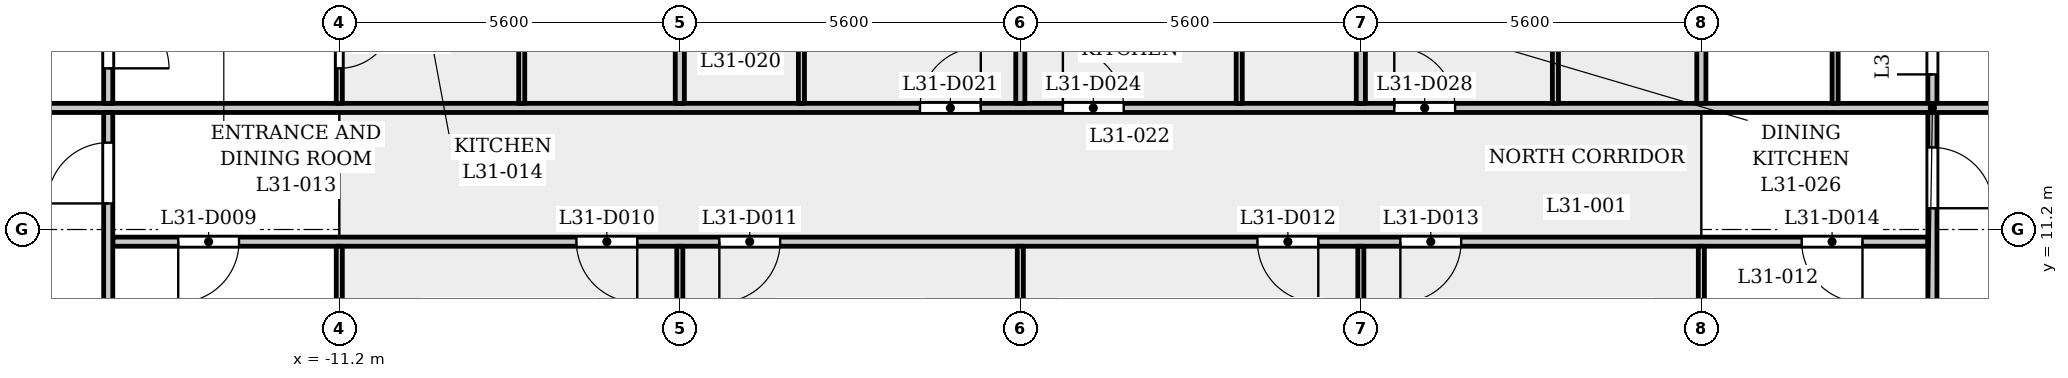
"""IFC4 building model, lengths in metres.
Left out: names, types, materials, properties, quantities, classifications, styles, units other than length and angle.
Written with IfcOpenShell. Run it as: python <this file> out.ifc"""

import sys

from ifc_helpers import new_model, si_unit, direction, frame, frame_2d, origin, place, context, subcontext, project, spatial, rectangle, extrude, element, fill, save


model = new_model("IFC4")
c1 = context("Model", 3, precision=1e-05, world=origin(), true_north=direction((0.0, 1.0)))
c2 = subcontext(c1, "Body", "Model", "MODEL_VIEW")
j1 = project(units=[si_unit("LENGTHUNIT", "METRE"), si_unit("PLANEANGLEUNIT", "RADIAN")], contexts=[c1])
p1 = place(None, origin())
s1 = spatial("IfcSite", under=j1, at=p1, CompositionType="ELEMENT")
p2 = place(p1, origin())
s2 = spatial("IfcBuilding", under=s1, at=p2, CompositionType="ELEMENT")
p3 = place(p2, frame((0.0, 0.0, 121.8)))
s3 = spatial("IfcBuildingStorey", under=s2, at=p3, CompositionType="ELEMENT", Elevation=121.8)
p4 = place(p3, frame((-14.925, 11.0, 0.0), z_axis=(0.0, 0.0, 1.0), x_axis=(1.0, 0.0, 0.0)))
e1 = element("IfcWall", 1, at=p4, inside=s3, PredefinedType="PARTITIONING", context=c2, shape_type="SweptSolid", body=[
    extrude(rectangle(XDim=29.85, YDim=0.15, at=frame_2d((14.925, 0.0))), origin(), (0.0, 0.0, 1.0), 3.15),
])
p5 = place(p4, frame((1.076, 0.0, 0.0)))
e2 = element("IfcOpeningElement", 2, at=p5, cuts=e1, PredefinedType="OPENING", context=c2, shape_type="SweptSolid", body=[
    extrude(rectangle(XDim=1.0, YDim=2.1, at=frame_2d((0.5, 1.05))), frame((0.0, 0.085, 0.0), z_axis=(0.0, -1.0, 0.0), x_axis=(1.0, 0.0, 0.0)), (0.0, 0.0, 1.0), 0.17),
])
p6 = place(p4, frame((7.625, 0.0, 0.0)))
e3 = element("IfcOpeningElement", 3, at=p6, cuts=e1, PredefinedType="OPENING", context=c2, shape_type="SweptSolid", body=[
    extrude(rectangle(XDim=1.0, YDim=2.1, at=frame_2d((0.5, 1.05))), frame((0.0, 0.085, 0.0), z_axis=(0.0, -1.0, 0.0), x_axis=(1.0, 0.0, 0.0)), (0.0, 0.0, 1.0), 0.17),
])
p7 = place(p4, frame((9.975, 0.0, 0.0)))
e4 = element("IfcOpeningElement", 4, at=p7, cuts=e1, PredefinedType="OPENING", context=c2, shape_type="SweptSolid", body=[
    extrude(rectangle(XDim=1.0, YDim=2.1, at=frame_2d((0.5, 1.05))), frame((0.0, 0.085, 0.0), z_axis=(0.0, -1.0, 0.0), x_axis=(1.0, 0.0, 0.0)), (0.0, 0.0, 1.0), 0.17),
])
p8 = place(p4, frame((18.825, 0.0, 0.0)))
e5 = element("IfcOpeningElement", 5, at=p8, cuts=e1, PredefinedType="OPENING", context=c2, shape_type="SweptSolid", body=[
    extrude(rectangle(XDim=1.0, YDim=2.1, at=frame_2d((0.5, 1.05))), frame((0.0, 0.085, 0.0), z_axis=(0.0, -1.0, 0.0), x_axis=(1.0, 0.0, 0.0)), (0.0, 0.0, 1.0), 0.17),
])
p9 = place(p4, frame((21.175, 0.0, 0.0)))
e6 = element("IfcOpeningElement", 6, at=p9, cuts=e1, PredefinedType="OPENING", context=c2, shape_type="SweptSolid", body=[
    extrude(rectangle(XDim=1.0, YDim=2.1, at=frame_2d((0.5, 1.05))), frame((0.0, 0.085, 0.0), z_axis=(0.0, -1.0, 0.0), x_axis=(1.0, 0.0, 0.0)), (0.0, 0.0, 1.0), 0.17),
])
p10 = place(p4, frame((27.775, 0.0, 0.0)))
e7 = element("IfcOpeningElement", 7, at=p10, cuts=e1, PredefinedType="OPENING", context=c2, shape_type="SweptSolid", body=[
    extrude(rectangle(XDim=1.0, YDim=2.1, at=frame_2d((0.5, 1.05))), frame((0.0, 0.085, 0.0), z_axis=(0.0, -1.0, 0.0), x_axis=(1.0, 0.0, 0.0)), (0.0, 0.0, 1.0), 0.17),
])
p11 = place(p3, frame((-17.4, 13.2, 0.0), z_axis=(0.0, 0.0, 1.0), x_axis=(1.0, 0.0, 0.0)))
e8 = element("IfcWall", 8, at=p11, inside=s3, PredefinedType="PARTITIONING", context=c2, shape_type="SweptSolid", body=[
    extrude(rectangle(XDim=34.8, YDim=0.15, at=frame_2d((17.4, 0.0))), origin(), (0.0, 0.0, 1.0), 3.15),
])
p12 = place(p11, frame((0.25, 0.0, 0.0)))
e9 = element("IfcOpeningElement", 9, at=p12, cuts=e8, PredefinedType="OPENING", context=c2, shape_type="SweptSolid", body=[
    extrude(rectangle(XDim=1.0, YDim=2.1, at=frame_2d((0.5, 1.05))), frame((0.0, 0.085, 0.0), z_axis=(0.0, -1.0, 0.0), x_axis=(1.0, 0.0, 0.0)), (0.0, 0.0, 1.0), 0.17),
])
p13 = place(p11, frame((33.65, 0.0, 0.0)))
e10 = element("IfcOpeningElement", 10, at=p13, cuts=e8, PredefinedType="OPENING", context=c2, shape_type="SweptSolid", body=[
    extrude(rectangle(XDim=1.0, YDim=2.1, at=frame_2d((0.5, 1.05))), frame((0.0, 0.085, 0.0), z_axis=(0.0, -1.0, 0.0), x_axis=(1.0, 0.0, 0.0)), (0.0, 0.0, 1.0), 0.17),
])
p14 = place(p11, frame((15.75, 0.0, 0.0)))
e11 = element("IfcOpeningElement", 11, at=p14, cuts=e8, PredefinedType="OPENING", context=c2, shape_type="SweptSolid", body=[
    extrude(rectangle(XDim=1.0, YDim=2.1, at=frame_2d((0.5, 1.05))), frame((0.0, 0.085, 0.0), z_axis=(0.0, -1.0, 0.0), x_axis=(1.0, 0.0, 0.0)), (0.0, 0.0, 1.0), 0.17),
])
p15 = place(p11, frame((18.1, 0.0, 0.0)))
e12 = element("IfcOpeningElement", 12, at=p15, cuts=e8, PredefinedType="OPENING", context=c2, shape_type="SweptSolid", body=[
    extrude(rectangle(XDim=1.0, YDim=2.1, at=frame_2d((0.5, 1.05))), frame((0.0, 0.085, 0.0), z_axis=(0.0, -1.0, 0.0), x_axis=(1.0, 0.0, 0.0)), (0.0, 0.0, 1.0), 0.17),
])
p16 = place(p11, frame((23.55, 0.0, 0.0)))
e13 = element("IfcOpeningElement", 13, at=p16, cuts=e8, PredefinedType="OPENING", context=c2, shape_type="SweptSolid", body=[
    extrude(rectangle(XDim=1.0, YDim=2.1, at=frame_2d((0.5, 1.05))), frame((0.0, 0.085, 0.0), z_axis=(0.0, -1.0, 0.0), x_axis=(1.0, 0.0, 0.0)), (0.0, 0.0, 1.0), 0.17),
])
p17 = place(p3, frame((-15.0, 6.769, 0.0), z_axis=(0.0, 0.0, 1.0), x_axis=(0.0, 1.0, 0.0)))
e14 = element("IfcWall", 14, at=p17, inside=s3, PredefinedType="PARTITIONING", context=c2, shape_type="SweptSolid", body=[
    extrude(rectangle(XDim=6.356, YDim=0.15, at=frame_2d((3.178, 0.0))), origin(), (0.0, 0.0, 1.0), 3.15),
])
p18 = place(p17, frame((4.86, 0.0, 0.0)))
e15 = element("IfcOpeningElement", 15, at=p18, cuts=e14, PredefinedType="OPENING", context=c2, shape_type="SweptSolid", body=[
    extrude(rectangle(XDim=1.0, YDim=2.1, at=frame_2d((0.5, 1.05))), frame((0.0, 0.085, 0.0), z_axis=(0.0, -1.0, 0.0), x_axis=(1.0, 0.0, 0.0)), (0.0, 0.0, 1.0), 0.17),
])
p19 = place(p3, frame((-15.0, 13.275, 0.0), z_axis=(0.0, 0.0, 1.0), x_axis=(0.0, 1.0, 0.0)))
e16 = element("IfcWall", 16, at=p19, inside=s3, PredefinedType="PARTITIONING", context=c2, shape_type="SweptSolid", body=[
    extrude(rectangle(XDim=2.05, YDim=0.15, at=frame_2d((1.025, 0.0))), origin(), (0.0, 0.0, 1.0), 3.15),
])
p20 = place(p19, frame((0.576, 0.0, 0.0)))
e17 = element("IfcOpeningElement", 17, at=p20, cuts=e16, PredefinedType="OPENING", context=c2, shape_type="SweptSolid", body=[
    extrude(rectangle(XDim=1.0, YDim=2.1, at=frame_2d((0.5, 1.05))), frame((0.0, 0.085, 0.0), z_axis=(0.0, -1.0, 0.0), x_axis=(1.0, 0.0, 0.0)), (0.0, 0.0, 1.0), 0.17),
])
p21 = place(p3, frame((-11.2, 7.32, 0.0), z_axis=(0.0, 0.0, 1.0), x_axis=(0.0, 1.0, 0.0)))
e18 = element("IfcWall", 18, at=p21, inside=s3, PredefinedType="PARTITIONING", context=c2, shape_type="SweptSolid", body=[
    extrude(rectangle(XDim=3.605, YDim=0.1, at=frame_2d((1.802, 0.0))), origin(), (0.0, 0.0, 1.0), 3.15),
])
p22 = place(p3, frame((-11.2, 13.275, 0.0), z_axis=(0.0, 0.0, 1.0), x_axis=(0.0, 1.0, 0.0)))
e19 = element("IfcWall", 19, at=p22, inside=s3, PredefinedType="PARTITIONING", context=c2, shape_type="SweptSolid", body=[
    extrude(rectangle(XDim=2.275, YDim=0.1, at=frame_2d((1.138, 0.0))), origin(), (0.0, 0.0, 1.0), 3.15),
])
p23 = place(p22, frame((0.576, 0.0, 0.0)))
e20 = element("IfcOpeningElement", 20, at=p23, cuts=e19, PredefinedType="OPENING", context=c2, shape_type="SweptSolid", body=[
    extrude(rectangle(XDim=0.9, YDim=2.1, at=frame_2d((0.45, 1.05))), frame((0.0, 0.06, 0.0), z_axis=(0.0, -1.0, 0.0), x_axis=(1.0, 0.0, 0.0)), (0.0, 0.0, 1.0), 0.12),
])
p24 = place(p3, frame((-8.2, 13.275, 0.0), z_axis=(0.0, 0.0, 1.0), x_axis=(0.0, 1.0, 0.0)))
e21 = element("IfcWall", 21, at=p24, inside=s3, PredefinedType="PARTITIONING", context=c2, shape_type="SweptSolid", body=[
    extrude(rectangle(XDim=2.275, YDim=0.1, at=frame_2d((1.138, 0.0))), origin(), (0.0, 0.0, 1.0), 3.15),
])
p25 = place(p3, frame((-5.6, 7.32, 0.0), z_axis=(0.0, 0.0, 1.0), x_axis=(0.0, 1.0, 0.0)))
e22 = element("IfcWall", 22, at=p25, inside=s3, PredefinedType="PARTITIONING", context=c2, shape_type="SweptSolid", body=[
    extrude(rectangle(XDim=3.605, YDim=0.1, at=frame_2d((1.802, 0.0))), origin(), (0.0, 0.0, 1.0), 3.15),
])
p26 = place(p3, frame((-5.6, 13.275, 0.0), z_axis=(0.0, 0.0, 1.0), x_axis=(0.0, 1.0, 0.0)))
e23 = element("IfcWall", 23, at=p26, inside=s3, PredefinedType="PARTITIONING", context=c2, shape_type="SweptSolid", body=[
    extrude(rectangle(XDim=2.275, YDim=0.15, at=frame_2d((1.138, 0.0))), origin(), (0.0, 0.0, 1.0), 3.15),
])
p27 = place(p3, frame((-3.6, 13.275, 0.0), z_axis=(0.0, 0.0, 1.0), x_axis=(0.0, 1.0, 0.0)))
e24 = element("IfcWall", 24, at=p27, inside=s3, PredefinedType="PARTITIONING", context=c2, shape_type="SweptSolid", body=[
    extrude(rectangle(XDim=2.275, YDim=0.1, at=frame_2d((1.138, 0.0))), origin(), (0.0, 0.0, 1.0), 3.15),
])
p28 = place(p3, frame((0.0, 7.32, 0.0), z_axis=(0.0, 0.0, 1.0), x_axis=(0.0, 1.0, 0.0)))
e25 = element("IfcWall", 25, at=p28, inside=s3, PredefinedType="PARTITIONING", context=c2, shape_type="SweptSolid", body=[
    extrude(rectangle(XDim=3.605, YDim=0.1, at=frame_2d((1.802, 0.0))), origin(), (0.0, 0.0, 1.0), 3.15),
])
p29 = place(p3, frame((0.0, 13.275, 0.0), z_axis=(0.0, 0.0, 1.0), x_axis=(0.0, 1.0, 0.0)))
e26 = element("IfcWall", 26, at=p29, inside=s3, PredefinedType="PARTITIONING", context=c2, shape_type="SweptSolid", body=[
    extrude(rectangle(XDim=2.275, YDim=0.15, at=frame_2d((1.138, 0.0))), origin(), (0.0, 0.0, 1.0), 3.15),
])
p30 = place(p3, frame((3.6, 13.275, 0.0), z_axis=(0.0, 0.0, 1.0), x_axis=(0.0, 1.0, 0.0)))
e27 = element("IfcWall", 27, at=p30, inside=s3, PredefinedType="PARTITIONING", context=c2, shape_type="SweptSolid", body=[
    extrude(rectangle(XDim=2.275, YDim=0.1, at=frame_2d((1.138, 0.0))), origin(), (0.0, 0.0, 1.0), 3.15),
])
p31 = place(p3, frame((5.6, 7.32, 0.0), z_axis=(0.0, 0.0, 1.0), x_axis=(0.0, 1.0, 0.0)))
e28 = element("IfcWall", 28, at=p31, inside=s3, PredefinedType="PARTITIONING", context=c2, shape_type="SweptSolid", body=[
    extrude(rectangle(XDim=3.605, YDim=0.1, at=frame_2d((1.802, 0.0))), origin(), (0.0, 0.0, 1.0), 3.15),
])
p32 = place(p3, frame((5.6, 13.275, 0.0), z_axis=(0.0, 0.0, 1.0), x_axis=(0.0, 1.0, 0.0)))
e29 = element("IfcWall", 29, at=p32, inside=s3, PredefinedType="PARTITIONING", context=c2, shape_type="SweptSolid", body=[
    extrude(rectangle(XDim=2.275, YDim=0.15, at=frame_2d((1.138, 0.0))), origin(), (0.0, 0.0, 1.0), 3.15),
])
p33 = place(p3, frame((8.8, 13.275, 0.0), z_axis=(0.0, 0.0, 1.0), x_axis=(0.0, 1.0, 0.0)))
e30 = element("IfcWall", 30, at=p33, inside=s3, PredefinedType="PARTITIONING", context=c2, shape_type="SweptSolid", body=[
    extrude(rectangle(XDim=2.275, YDim=0.1, at=frame_2d((1.138, 0.0))), origin(), (0.0, 0.0, 1.0), 3.15),
])
p34 = place(p3, frame((11.2, 7.32, 0.0), z_axis=(0.0, 0.0, 1.0), x_axis=(0.0, 1.0, 0.0)))
e31 = element("IfcWall", 31, at=p34, inside=s3, PredefinedType="PARTITIONING", context=c2, shape_type="SweptSolid", body=[
    extrude(rectangle(XDim=3.605, YDim=0.1, at=frame_2d((1.802, 0.0))), origin(), (0.0, 0.0, 1.0), 3.15),
])
p35 = place(p3, frame((11.2, 13.275, 0.0), z_axis=(0.0, 0.0, 1.0), x_axis=(0.0, 1.0, 0.0)))
e32 = element("IfcWall", 32, at=p35, inside=s3, PredefinedType="PARTITIONING", context=c2, shape_type="SweptSolid", body=[
    extrude(rectangle(XDim=2.275, YDim=0.15, at=frame_2d((1.138, 0.0))), origin(), (0.0, 0.0, 1.0), 3.15),
])
p36 = place(p3, frame((13.4, 13.275, 0.0), z_axis=(0.0, 0.0, 1.0), x_axis=(0.0, 1.0, 0.0)))
e33 = element("IfcWall", 33, at=p36, inside=s3, PredefinedType="PARTITIONING", context=c2, shape_type="SweptSolid", body=[
    extrude(rectangle(XDim=2.275, YDim=0.1, at=frame_2d((1.138, 0.0))), origin(), (0.0, 0.0, 1.0), 3.15),
])
p37 = place(p3, frame((15.0, 6.769, 0.0), z_axis=(0.0, 0.0, 1.0), x_axis=(0.0, 1.0, 0.0)))
e34 = element("IfcWall", 34, at=p37, inside=s3, PredefinedType="PARTITIONING", context=c2, shape_type="SweptSolid", body=[
    extrude(rectangle(XDim=6.356, YDim=0.15, at=frame_2d((3.178, 0.0))), origin(), (0.0, 0.0, 1.0), 3.15),
])
p38 = place(p37, frame((4.781, 0.0, 0.0)))
e35 = element("IfcOpeningElement", 35, at=p38, cuts=e34, PredefinedType="OPENING", context=c2, shape_type="SweptSolid", body=[
    extrude(rectangle(XDim=1.0, YDim=2.1, at=frame_2d((0.5, 1.05))), frame((0.0, 0.085, 0.0), z_axis=(0.0, -1.0, 0.0), x_axis=(1.0, 0.0, 0.0)), (0.0, 0.0, 1.0), 0.17),
])
p39 = place(p3, frame((15.0, 13.275, 0.0), z_axis=(0.0, 0.0, 1.0), x_axis=(0.0, 1.0, 0.0)))
e36 = element("IfcWall", 36, at=p39, inside=s3, PredefinedType="PARTITIONING", context=c2, shape_type="SweptSolid", body=[
    extrude(rectangle(XDim=2.05, YDim=0.15, at=frame_2d((1.025, 0.0))), origin(), (0.0, 0.0, 1.0), 3.15),
])
p40 = place(p39, frame((0.476, 0.0, 0.0)))
e37 = element("IfcOpeningElement", 37, at=p40, cuts=e36, PredefinedType="OPENING", context=c2, shape_type="SweptSolid", body=[
    extrude(rectangle(XDim=1.0, YDim=2.1, at=frame_2d((0.5, 1.05))), frame((0.0, 0.085, 0.0), z_axis=(0.0, -1.0, 0.0), x_axis=(1.0, 0.0, 0.0)), (0.0, 0.0, 1.0), 0.17),
])
p41 = place(p18, origin())
e38 = element("IfcDoor", 38, at=p41, inside=s3, OperationType="SINGLE_SWING_RIGHT", PredefinedType="DOOR", context=c2, shape_type="SweptSolid", body=[
    extrude(rectangle(XDim=1.0, YDim=2.1, at=frame_2d((0.5, 1.05))), frame((0.0, 0.025, 0.0), z_axis=(0.0, -1.0, 0.0), x_axis=(1.0, 0.0, 0.0)), (0.0, 0.0, 1.0), 0.05),
])
fill(e15, e38)
p42 = place(p38, origin())
e39 = element("IfcDoor", 39, at=p42, inside=s3, OperationType="SINGLE_SWING_LEFT", PredefinedType="DOOR", context=c2, shape_type="SweptSolid", body=[
    extrude(rectangle(XDim=1.0, YDim=2.1, at=frame_2d((0.5, 1.05))), frame((0.0, 0.025, 0.0), z_axis=(0.0, -1.0, 0.0), x_axis=(1.0, 0.0, 0.0)), (0.0, 0.0, 1.0), 0.05),
])
fill(e35, e39)
p43 = place(p5, origin())
e40 = element("IfcDoor", 40, at=p43, inside=s3, OperationType="SINGLE_SWING_LEFT", PredefinedType="DOOR", context=c2, shape_type="SweptSolid", body=[
    extrude(rectangle(XDim=1.0, YDim=2.1, at=frame_2d((0.5, 1.05))), frame((0.0, 0.025, 0.0), z_axis=(0.0, -1.0, 0.0), x_axis=(1.0, 0.0, 0.0)), (0.0, 0.0, 1.0), 0.05),
])
fill(e2, e40)
p44 = place(p6, origin())
e41 = element("IfcDoor", 41, at=p44, inside=s3, OperationType="SINGLE_SWING_RIGHT", PredefinedType="DOOR", context=c2, shape_type="SweptSolid", body=[
    extrude(rectangle(XDim=1.0, YDim=2.1, at=frame_2d((0.5, 1.05))), frame((0.0, 0.025, 0.0), z_axis=(0.0, -1.0, 0.0), x_axis=(1.0, 0.0, 0.0)), (0.0, 0.0, 1.0), 0.05),
])
fill(e3, e41)
p45 = place(p7, origin())
e42 = element("IfcDoor", 42, at=p45, inside=s3, OperationType="SINGLE_SWING_LEFT", PredefinedType="DOOR", context=c2, shape_type="SweptSolid", body=[
    extrude(rectangle(XDim=1.0, YDim=2.1, at=frame_2d((0.5, 1.05))), frame((0.0, 0.025, 0.0), z_axis=(0.0, -1.0, 0.0), x_axis=(1.0, 0.0, 0.0)), (0.0, 0.0, 1.0), 0.05),
])
fill(e4, e42)
p46 = place(p8, origin())
e43 = element("IfcDoor", 43, at=p46, inside=s3, OperationType="SINGLE_SWING_RIGHT", PredefinedType="DOOR", context=c2, shape_type="SweptSolid", body=[
    extrude(rectangle(XDim=1.0, YDim=2.1, at=frame_2d((0.5, 1.05))), frame((0.0, 0.025, 0.0), z_axis=(0.0, -1.0, 0.0), x_axis=(1.0, 0.0, 0.0)), (0.0, 0.0, 1.0), 0.05),
])
fill(e5, e43)
p47 = place(p9, origin())
e44 = element("IfcDoor", 44, at=p47, inside=s3, OperationType="SINGLE_SWING_LEFT", PredefinedType="DOOR", context=c2, shape_type="SweptSolid", body=[
    extrude(rectangle(XDim=1.0, YDim=2.1, at=frame_2d((0.5, 1.05))), frame((0.0, 0.025, 0.0), z_axis=(0.0, -1.0, 0.0), x_axis=(1.0, 0.0, 0.0)), (0.0, 0.0, 1.0), 0.05),
])
fill(e6, e44)
p48 = place(p10, origin())
e45 = element("IfcDoor", 45, at=p48, inside=s3, OperationType="SINGLE_SWING_RIGHT", PredefinedType="DOOR", context=c2, shape_type="SweptSolid", body=[
    extrude(rectangle(XDim=1.0, YDim=2.1, at=frame_2d((0.5, 1.05))), frame((0.0, 0.025, 0.0), z_axis=(0.0, -1.0, 0.0), x_axis=(1.0, 0.0, 0.0)), (0.0, 0.0, 1.0), 0.05),
])
fill(e7, e45)
p49 = place(p20, origin())
e46 = element("IfcDoor", 46, at=p49, inside=s3, OperationType="SINGLE_SWING_LEFT", PredefinedType="DOOR", context=c2, shape_type="SweptSolid", body=[
    extrude(rectangle(XDim=1.0, YDim=2.1, at=frame_2d((0.5, 1.05))), frame((0.0, 0.025, 0.0), z_axis=(0.0, -1.0, 0.0), x_axis=(1.0, 0.0, 0.0)), (0.0, 0.0, 1.0), 0.05),
])
fill(e17, e46)
p50 = place(p23, origin())
e47 = element("IfcDoor", 47, at=p50, inside=s3, OperationType="SINGLE_SWING_RIGHT", PredefinedType="DOOR", context=c2, shape_type="SweptSolid", body=[
    extrude(rectangle(XDim=0.9, YDim=2.1, at=frame_2d((0.45, 1.05))), frame((0.0, 0.025, 0.0), z_axis=(0.0, -1.0, 0.0), x_axis=(1.0, 0.0, 0.0)), (0.0, 0.0, 1.0), 0.05),
])
fill(e20, e47)
p51 = place(p14, origin())
e48 = element("IfcDoor", 48, at=p51, inside=s3, OperationType="SINGLE_SWING_LEFT", PredefinedType="DOOR", context=c2, shape_type="SweptSolid", body=[
    extrude(rectangle(XDim=1.0, YDim=2.1, at=frame_2d((0.5, 1.05))), frame((0.0, 0.025, 0.0), z_axis=(0.0, -1.0, 0.0), x_axis=(1.0, 0.0, 0.0)), (0.0, 0.0, 1.0), 0.05),
])
fill(e11, e48)
p52 = place(p15, origin())
e49 = element("IfcDoor", 49, at=p52, inside=s3, OperationType="SINGLE_SWING_RIGHT", PredefinedType="DOOR", context=c2, shape_type="SweptSolid", body=[
    extrude(rectangle(XDim=1.0, YDim=2.1, at=frame_2d((0.5, 1.05))), frame((0.0, 0.025, 0.0), z_axis=(0.0, -1.0, 0.0), x_axis=(1.0, 0.0, 0.0)), (0.0, 0.0, 1.0), 0.05),
])
fill(e12, e49)
p53 = place(p16, origin())
e50 = element("IfcDoor", 50, at=p53, inside=s3, OperationType="SINGLE_SWING_RIGHT", PredefinedType="DOOR", context=c2, shape_type="SweptSolid", body=[
    extrude(rectangle(XDim=1.0, YDim=2.1, at=frame_2d((0.5, 1.05))), frame((0.0, 0.025, 0.0), z_axis=(0.0, -1.0, 0.0), x_axis=(1.0, 0.0, 0.0)), (0.0, 0.0, 1.0), 0.05),
])
fill(e13, e50)
p54 = place(p40, origin())
e51 = element("IfcDoor", 51, at=p54, inside=s3, OperationType="SINGLE_SWING_RIGHT", PredefinedType="DOOR", context=c2, shape_type="SweptSolid", body=[
    extrude(rectangle(XDim=1.0, YDim=2.1, at=frame_2d((0.5, 1.05))), frame((0.0, 0.025, 0.0), z_axis=(0.0, -1.0, 0.0), x_axis=(1.0, 0.0, 0.0)), (0.0, 0.0, 1.0), 0.05),
])
fill(e37, e51)
save(model, sys.argv[1])
